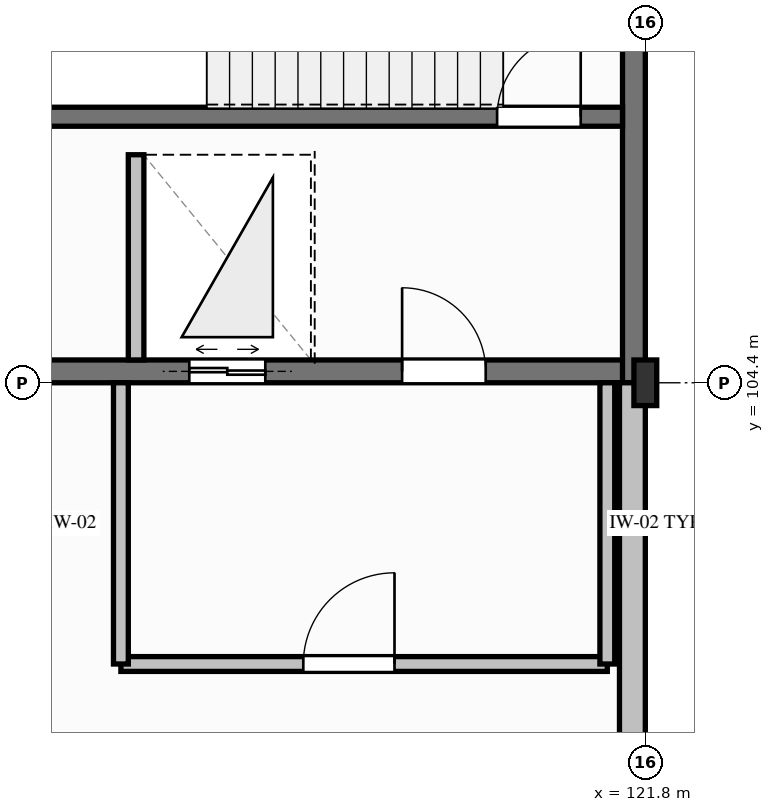
"""IFC4 building model, lengths in metres.
Left out: names, types, materials, properties, quantities, classifications, styles, units other than length and angle.
Written with IfcOpenShell. Run it as: python <this file> out.ifc"""

import sys

from ifc_helpers import new_model, si_unit, direction, frame, frame_2d, origin, origin_2d, place, context, subcontext, project, spatial, rectangle, i_section, extrude, element, fill, save


model = new_model("IFC4")
c1 = context("Model", 3, precision=1e-05, world=origin(), true_north=direction((0.0, 1.0)))
c2 = subcontext(c1, "Body", "Model", "MODEL_VIEW")
j1 = project(units=[si_unit("LENGTHUNIT", "METRE"), si_unit("PLANEANGLEUNIT", "RADIAN")], contexts=[c1])
p1 = place(None, origin())
s1 = spatial("IfcSite", under=j1, at=p1, CompositionType="ELEMENT")
p2 = place(p1, origin())
s2 = spatial("IfcBuilding", under=s1, at=p2, CompositionType="ELEMENT")
p3 = place(p2, frame((0.0, 0.0, 9.0)))
s3 = spatial("IfcBuildingStorey", under=s2, at=p3, CompositionType="ELEMENT", Elevation=9.0)
p4 = place(p3, frame((113.4, 104.55, 0.0), z_axis=(0.0, 0.0, 1.0), x_axis=(1.0, 0.0, 0.0)))
e1 = element("IfcWall", 1, at=p4, inside=s3, PredefinedType="SHEAR", context=c2, shape_type="SweptSolid", body=[
    extrude(rectangle(XDim=8.4, YDim=0.3, at=frame_2d((4.2, 0.0))), origin(), (0.0, 0.0, 1.0), 4.2),
])
p5 = place(p4, frame((5.2, 0.0, 0.0)))
e2 = element("IfcOpeningElement", 2, at=p5, cuts=e1, PredefinedType="OPENING", context=c2, shape_type="SweptSolid", body=[
    extrude(rectangle(XDim=1.1, YDim=2.15, at=frame_2d((0.55, 1.075))), frame((0.0, 0.16, 0.0), z_axis=(0.0, -1.0, 0.0), x_axis=(1.0, 0.0, 0.0)), (0.0, 0.0, 1.0), 0.32),
])
p6 = place(p4, frame((2.4, 0.0, 0.0)))
e3 = element("IfcOpeningElement", 3, at=p6, cuts=e1, PredefinedType="OPENING", context=c2, shape_type="SweptSolid", body=[
    extrude(rectangle(XDim=1.0, YDim=2.1, at=frame_2d((0.5, 1.05))), frame((0.0, 0.16, 0.0), z_axis=(0.0, -1.0, 0.0), x_axis=(1.0, 0.0, 0.0)), (0.0, 0.0, 1.0), 0.32),
])
p7 = place(p3, frame((121.65, 111.6, 0.0), z_axis=(0.0, 0.0, 1.0), x_axis=(0.0, -1.0, 0.0)))
e4 = element("IfcWall", 4, at=p7, inside=s3, PredefinedType="SHEAR", context=c2, shape_type="SweptSolid", body=[
    extrude(rectangle(XDim=7.2, YDim=0.3, at=frame_2d((3.6, 0.0))), origin(), (0.0, 0.0, 1.0), 4.2),
])
p8 = place(p3, frame((113.7, 107.9, 0.0), z_axis=(0.0, 0.0, 1.0), x_axis=(1.0, 0.0, 0.0)))
e5 = element("IfcWall", 5, at=p8, inside=s3, PredefinedType="SHEAR", context=c2, shape_type="SweptSolid", body=[
    extrude(rectangle(XDim=7.8, YDim=0.25, at=frame_2d((3.9, 0.0))), origin(), (0.0, 0.0, 1.0), 4.2),
])
p9 = place(p8, frame((6.15, 0.0, 0.0)))
e6 = element("IfcOpeningElement", 6, at=p9, cuts=e5, PredefinedType="OPENING", context=c2, shape_type="SweptSolid", body=[
    extrude(rectangle(XDim=1.1, YDim=2.15, at=frame_2d((0.55, 1.075))), frame((0.0, 0.135, 0.0), z_axis=(0.0, -1.0, 0.0), x_axis=(1.0, 0.0, 0.0)), (0.0, 0.0, 1.0), 0.27),
])
p10 = place(p3, frame((121.8, 104.4, 0.0), z_axis=(0.0, 0.0, 1.0), x_axis=(1.0, 0.0, 0.0)))
e7 = element("IfcColumn", 7, at=p10, inside=s3, PredefinedType="COLUMN", context=c2, shape_type="SweptSolid", body=[
    extrude(i_section(OverallWidth=0.3, OverallDepth=0.6, WebThickness=0.015, FlangeThickness=0.03, FilletRadius=0.027, at=origin_2d()), origin(), (0.0, 0.0, 1.0), 4.2),
])
p11 = place(p3, frame((121.63, 104.4, 0.0), z_axis=(0.0, 0.0, 1.0), x_axis=(0.0, -1.0, 0.0)))
e8 = element("IfcWall", 8, at=p11, inside=s3, PredefinedType="SOLIDWALL", context=c2, shape_type="SweptSolid", body=[
    extrude(rectangle(XDim=21.6, YDim=0.34, at=frame_2d((10.8, 0.0))), origin(), (0.0, 0.0, 1.0), 3.328),
])
p12 = place(p3, frame((115.1, 104.7, 0.0), z_axis=(0.0, 0.0, 1.0), x_axis=(0.0, 1.0, 0.0)))
e9 = element("IfcWall", 9, at=p12, inside=s3, PredefinedType="PARTITIONING", context=c2, shape_type="SweptSolid", body=[
    extrude(rectangle(XDim=2.7, YDim=0.205, at=frame_2d((1.35, 0.0))), origin(), (0.0, 0.0, 1.0), 3.678),
])
p13 = place(p3, frame((114.9, 100.7, 0.0), z_axis=(0.0, 0.0, 1.0), x_axis=(1.0, 0.0, 0.0)))
e10 = element("IfcWall", 10, at=p13, inside=s3, PredefinedType="PARTITIONING", context=c2, shape_type="SweptSolid", body=[
    extrude(rectangle(XDim=6.4, YDim=0.195, at=frame_2d((3.2, 0.0))), origin(), (0.0, 0.0, 1.0), 3.93),
])
p14 = place(p13, frame((2.4, 0.0, 0.0)))
e11 = element("IfcOpeningElement", 11, at=p14, cuts=e10, PredefinedType="OPENING", context=c2, shape_type="SweptSolid", body=[
    extrude(rectangle(XDim=1.2, YDim=2.15, at=frame_2d((0.6, 1.075))), frame((0.0, 0.107, 0.0), z_axis=(0.0, -1.0, 0.0), x_axis=(1.0, 0.0, 0.0)), (0.0, 0.0, 1.0), 0.215),
])
for number, where, z_axis, x_axis in (
    (12, (121.3, 100.7, 0.0), (0.0, 0.0, 1.0), (0.0, 1.0, 0.0)),
    (13, (114.9, 100.7, 0.0), (0.0, 0.0, 1.0), (0.0, 1.0, 0.0)),
):
    element("IfcWall", number, at=place(p3, frame(where, z_axis=z_axis, x_axis=x_axis)), inside=s3, PredefinedType="PARTITIONING", context=c2, shape_type="SweptSolid", body=[
        extrude(rectangle(XDim=3.7, YDim=0.195, at=frame_2d((1.85, 0.0))), origin(), (0.0, 0.0, 1.0), 3.658),
    ])
p15 = place(p9, origin())
e14 = element("IfcDoor", 14, at=p15, inside=s3, OperationType="SINGLE_SWING_RIGHT", PredefinedType="DOOR", context=c2, shape_type="SweptSolid", body=[
    extrude(rectangle(XDim=1.1, YDim=2.15, at=frame_2d((0.55, 1.075))), frame((0.0, 0.025, 0.0), z_axis=(0.0, -1.0, 0.0), x_axis=(1.0, 0.0, 0.0)), (0.0, 0.0, 1.0), 0.05),
])
fill(e6, e14)
p16 = place(p5, origin())
e15 = element("IfcDoor", 15, at=p16, inside=s3, OperationType="SINGLE_SWING_LEFT", PredefinedType="DOOR", context=c2, shape_type="SweptSolid", body=[
    extrude(rectangle(XDim=1.1, YDim=2.15, at=frame_2d((0.55, 1.075))), frame((0.0, 0.025, 0.0), z_axis=(0.0, -1.0, 0.0), x_axis=(1.0, 0.0, 0.0)), (0.0, 0.0, 1.0), 0.05),
])
fill(e2, e15)
p17 = place(p6, origin())
e16 = element("IfcDoor", 16, at=p17, inside=s3, OperationType="DOUBLE_DOOR_SLIDING", PredefinedType="DOOR", context=c2, shape_type="SweptSolid", body=[
    extrude(rectangle(XDim=1.0, YDim=2.1, at=frame_2d((0.5, 1.05))), frame((0.0, 0.025, 0.0), z_axis=(0.0, -1.0, 0.0), x_axis=(1.0, 0.0, 0.0)), (0.0, 0.0, 1.0), 0.05),
])
fill(e3, e16)
p18 = place(p14, origin())
e17 = element("IfcDoor", 17, at=p18, inside=s3, OperationType="SINGLE_SWING_RIGHT", PredefinedType="DOOR", context=c2, shape_type="SweptSolid", body=[
    extrude(rectangle(XDim=1.2, YDim=2.15, at=frame_2d((0.6, 1.075))), frame((0.0, 0.025, 0.0), z_axis=(0.0, -1.0, 0.0), x_axis=(1.0, 0.0, 0.0)), (0.0, 0.0, 1.0), 0.05),
])
fill(e11, e17)
save(model, sys.argv[1])
